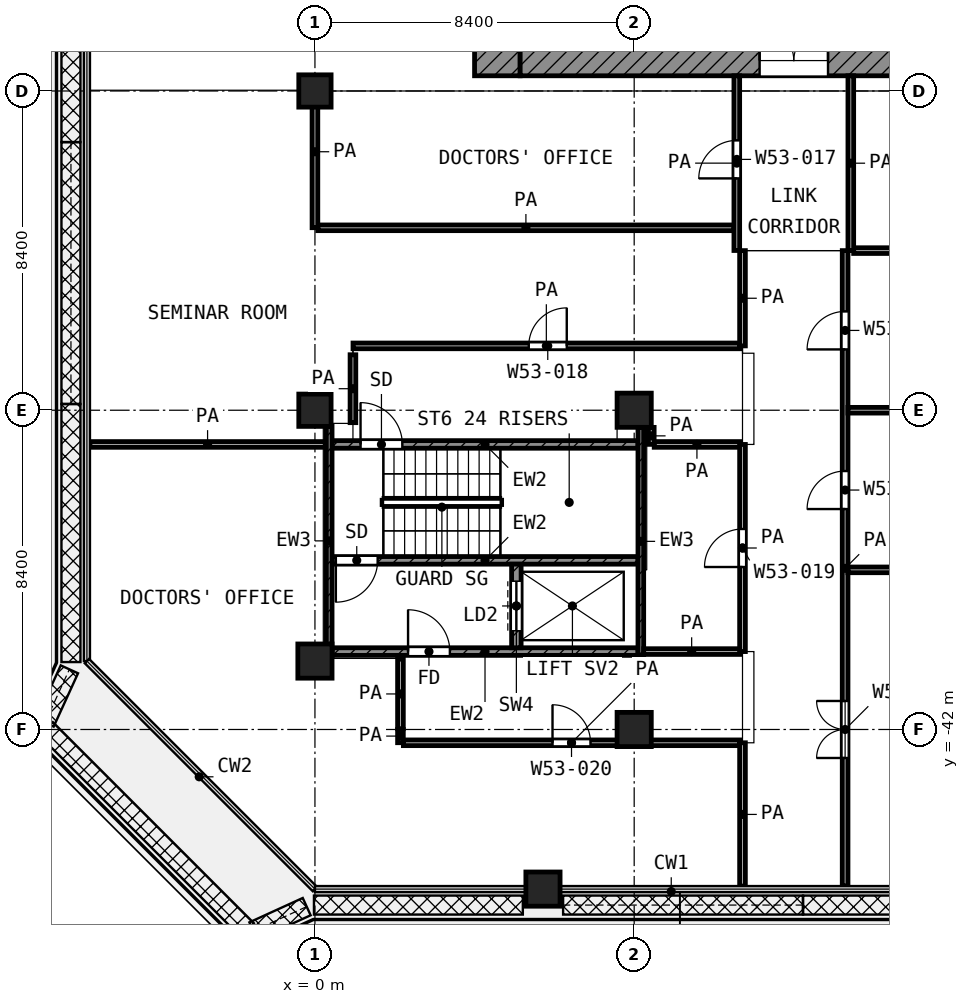
"""IFC4 building model, lengths in metres.
Left out: names, types, materials, properties, quantities, classifications, styles, units other than length and angle.
Written with IfcOpenShell. Run it as: python <this file> out.ifc"""

import sys

from ifc_helpers import new_model, si_unit, direction, frame, frame_2d, origin, origin_2d, place, context, subcontext, project, spatial, rectangle, extrude, element, fill, save


model = new_model("IFC4")
c1 = context("Model", 3, precision=1e-05, world=origin(), true_north=direction((0.0, 1.0)))
c2 = subcontext(c1, "Body", "Model", "MODEL_VIEW")
j1 = project(units=[si_unit("LENGTHUNIT", "METRE"), si_unit("PLANEANGLEUNIT", "RADIAN")], contexts=[c1])
p1 = place(None, origin())
s1 = spatial("IfcSite", under=j1, at=p1, CompositionType="ELEMENT")
p2 = place(p1, origin())
s2 = spatial("IfcBuilding", under=s1, at=p2, CompositionType="ELEMENT")
p3 = place(p2, frame((0.0, 0.0, 251.6)))
s3 = spatial("IfcBuildingStorey", under=s2, at=p3, CompositionType="ELEMENT", Elevation=251.6)
for number, where, z_axis, x_axis in (
    (1, (0.0, -25.2, 0.0), (0.0, 0.0, 1.0), (1.0, 0.0, 0.0)),
    (2, (0.0, -33.6, 0.0), (0.0, 0.0, 1.0), (1.0, 0.0, 0.0)),
):
    element("IfcColumn", number, at=place(p3, frame(where, z_axis=z_axis, x_axis=x_axis)), inside=s3, PredefinedType="COLUMN", context=c2, shape_type="SweptSolid", body=[
        extrude(rectangle(XDim=0.85, YDim=0.85, at=origin_2d()), origin(), (0.0, 0.0, 1.0), 4.2),
    ])
for number, where, z_axis, x_axis in (
    (3, (8.4, -33.6, 0.0), (0.0, 0.0, 1.0), (1.0, 0.0, 0.0)),
    (4, (0.0, -40.2, 0.0), (0.0, 0.0, 1.0), (1.0, 0.0, 0.0)),
    (5, (8.4, -42.0, 0.0), (0.0, 0.0, 1.0), (1.0, 0.0, 0.0)),
    (6, (6.0, -46.2, 0.0), (0.0, 0.0, 1.0), (1.0, 0.0, 0.0)),
):
    element("IfcColumn", number, at=place(p3, frame(where, z_axis=z_axis, x_axis=x_axis)), inside=s3, PredefinedType="COLUMN", context=c2, shape_type="SweptSolid", body=[
        extrude(rectangle(XDim=0.9, YDim=0.9, at=origin_2d()), origin(), (0.0, 0.0, 1.0), 4.2),
    ])
p4 = place(p3, frame((4.8, -24.8, 0.0), z_axis=(0.0, 0.0, 1.0), x_axis=(0.0, 1.0, 0.0)))
e7 = element("IfcWall", 7, at=p4, inside=s3, PredefinedType="SHEAR", context=c2, shape_type="SweptSolid", body=[
    extrude(rectangle(XDim=19.4, YDim=1.2, at=frame_2d((9.7, 0.0))), origin(), (0.0, 0.0, 1.0), 3.6),
])
p5 = place(p4, frame((11.25, 0.0, 0.0)))
e8 = element("IfcOpeningElement", 8, at=p5, cuts=e7, PredefinedType="OPENING", context=c2, shape_type="SweptSolid", body=[
    extrude(rectangle(XDim=1.1, YDim=2.1, at=frame_2d((0.55, 1.05))), frame((0.0, 0.61, 0.0), z_axis=(0.0, -1.0, 0.0), x_axis=(1.0, 0.0, 0.0)), (0.0, 0.0, 1.0), 1.22),
])
p6 = place(p4, frame((1.95, 0.0, 0.0)))
e9 = element("IfcOpeningElement", 9, at=p6, cuts=e7, PredefinedType="OPENING", context=c2, shape_type="SweptSolid", body=[
    extrude(rectangle(XDim=1.1, YDim=2.1, at=frame_2d((0.55, 1.05))), frame((0.0, 0.61, 0.0), z_axis=(0.0, -1.0, 0.0), x_axis=(1.0, 0.0, 0.0)), (0.0, 0.0, 1.0), 1.22),
])
p7 = place(p3, frame((5.4, -24.4, 0.0), z_axis=(0.0, 0.0, 1.0), x_axis=(1.0, 0.0, 0.0)))
e10 = element("IfcWall", 10, at=p7, inside=s3, PredefinedType="SHEAR", context=c2, shape_type="SweptSolid", body=[
    extrude(rectangle(XDim=18.6, YDim=0.8, at=frame_2d((9.3, 0.0))), origin(), (0.0, 0.0, 1.0), 3.6),
])
p8 = place(p7, frame((6.3, 0.0, 0.0)))
e11 = element("IfcOpeningElement", 11, at=p8, cuts=e10, PredefinedType="OPENING", context=c2, shape_type="SweptSolid", body=[
    extrude(rectangle(XDim=1.8, YDim=2.1, at=frame_2d((0.9, 1.05))), frame((0.0, 0.41, 0.0), z_axis=(0.0, -1.0, 0.0), x_axis=(1.0, 0.0, 0.0)), (0.0, 0.0, 1.0), 0.82),
])
p9 = place(p3, frame((0.375, -40.05, 0.0), z_axis=(0.0, 0.0, 1.0), x_axis=(0.0, 1.0, 0.0)))
e12 = element("IfcWall", 12, at=p9, inside=s3, PredefinedType="SHEAR", context=c2, shape_type="SweptSolid", body=[
    extrude(rectangle(XDim=6.025, YDim=0.15, at=frame_2d((3.013, 0.0))), origin(), (0.0, 0.0, 1.0), 3.6),
])
p10 = place(p3, frame((8.575, -40.05, 0.0), z_axis=(0.0, 0.0, 1.0), x_axis=(0.0, 1.0, 0.0)))
e13 = element("IfcWall", 13, at=p10, inside=s3, PredefinedType="SHEAR", context=c2, shape_type="SweptSolid", body=[
    extrude(rectangle(XDim=6.0, YDim=0.15, at=frame_2d((3.0, 0.0))), origin(), (0.0, 0.0, 1.0), 3.6),
])
p11 = place(p3, frame((0.45, -34.5, 0.0), z_axis=(0.0, 0.0, 1.0), x_axis=(1.0, 0.0, 0.0)))
e14 = element("IfcWall", 14, at=p11, inside=s3, PredefinedType="SHEAR", context=c2, shape_type="SweptSolid", body=[
    extrude(rectangle(XDim=8.05, YDim=0.2, at=frame_2d((4.025, 0.0))), origin(), (0.0, 0.0, 1.0), 3.6),
])
p12 = place(p11, frame((0.75, 0.0, 0.0)))
e15 = element("IfcOpeningElement", 15, at=p12, cuts=e14, PredefinedType="OPENING", context=c2, shape_type="SweptSolid", body=[
    extrude(rectangle(XDim=1.1, YDim=2.1, at=frame_2d((0.55, 1.05))), frame((0.0, 0.11, 0.0), z_axis=(0.0, -1.0, 0.0), x_axis=(1.0, 0.0, 0.0)), (0.0, 0.0, 1.0), 0.22),
])
p13 = place(p3, frame((0.45, -37.55, 0.0), z_axis=(0.0, 0.0, 1.0), x_axis=(1.0, 0.0, 0.0)))
e16 = element("IfcWall", 16, at=p13, inside=s3, PredefinedType="SHEAR", context=c2, shape_type="SweptSolid", body=[
    extrude(rectangle(XDim=8.05, YDim=0.2, at=frame_2d((4.025, 0.0))), origin(), (0.0, 0.0, 1.0), 3.6),
])
p14 = place(p13, frame((0.1, 0.0, 0.0)))
e17 = element("IfcOpeningElement", 17, at=p14, cuts=e16, PredefinedType="OPENING", context=c2, shape_type="SweptSolid", body=[
    extrude(rectangle(XDim=1.1, YDim=2.1, at=frame_2d((0.55, 1.05))), frame((0.0, 0.11, 0.0), z_axis=(0.0, -1.0, 0.0), x_axis=(1.0, 0.0, 0.0)), (0.0, 0.0, 1.0), 0.22),
])
p15 = place(p3, frame((0.45, -39.95, 0.0), z_axis=(0.0, 0.0, 1.0), x_axis=(1.0, 0.0, 0.0)))
e18 = element("IfcWall", 18, at=p15, inside=s3, PredefinedType="SHEAR", context=c2, shape_type="SweptSolid", body=[
    extrude(rectangle(XDim=8.05, YDim=0.2, at=frame_2d((4.025, 0.0))), origin(), (0.0, 0.0, 1.0), 3.6),
])
p16 = place(p15, frame((2.0, 0.0, 0.0)))
e19 = element("IfcOpeningElement", 19, at=p16, cuts=e18, PredefinedType="OPENING", context=c2, shape_type="SweptSolid", body=[
    extrude(rectangle(XDim=1.1, YDim=2.1, at=frame_2d((0.55, 1.05))), frame((0.0, 0.11, 0.0), z_axis=(0.0, -1.0, 0.0), x_axis=(1.0, 0.0, 0.0)), (0.0, 0.0, 1.0), 0.22),
])
p17 = place(p3, frame((5.3, -39.85, 0.0), z_axis=(0.0, 0.0, 1.0), x_axis=(0.0, 1.0, 0.0)))
e20 = element("IfcWall", 20, at=p17, inside=s3, PredefinedType="SHEAR", context=c2, shape_type="SweptSolid", body=[
    extrude(rectangle(XDim=2.2, YDim=0.25, at=frame_2d((1.1, 0.0))), origin(), (0.0, 0.0, 1.0), 3.6),
])
p18 = place(p17, frame((0.45, 0.0, 0.0)))
e21 = element("IfcOpeningElement", 21, at=p18, cuts=e20, PredefinedType="OPENING", context=c2, shape_type="SweptSolid", body=[
    extrude(rectangle(XDim=1.3, YDim=2.1, at=frame_2d((0.65, 1.05))), frame((0.0, 0.135, 0.0), z_axis=(0.0, -1.0, 0.0), x_axis=(1.0, 0.0, 0.0)), (0.0, 0.0, 1.0), 0.27),
])
p19 = place(p3, frame((2.327, -42.35, 0.0), z_axis=(0.0, 0.0, 1.0), x_axis=(1.0, 0.0, 0.0)))
e22 = element("IfcWall", 22, at=p19, inside=s3, PredefinedType="PARTITIONING", context=c2, shape_type="SweptSolid", body=[
    extrude(rectangle(XDim=8.848, YDim=0.15, at=frame_2d((4.424, 0.0))), origin(), (0.0, 0.0, 1.0), 3.6),
])
p20 = place(p19, frame((3.924, 0.0, 0.0)))
e23 = element("IfcOpeningElement", 23, at=p20, cuts=e22, PredefinedType="OPENING", context=c2, shape_type="SweptSolid", body=[
    extrude(rectangle(XDim=1.0, YDim=2.1, at=frame_2d((0.5, 1.05))), frame((0.0, 0.085, 0.0), z_axis=(0.0, -1.0, 0.0), x_axis=(1.0, 0.0, 0.0)), (0.0, 0.0, 1.0), 0.17),
])
p21 = place(p3, frame((8.65, -39.95, 0.0), z_axis=(0.0, 0.0, 1.0), x_axis=(1.0, 0.0, 0.0)))
e24 = element("IfcWall", 24, at=p21, inside=s3, PredefinedType="PARTITIONING", context=c2, shape_type="SweptSolid", body=[
    extrude(rectangle(XDim=2.525, YDim=0.15, at=frame_2d((1.263, 0.0))), origin(), (0.0, 0.0, 1.0), 3.6),
])
p22 = place(p3, frame((14.025, -37.8, 0.0), z_axis=(0.0, 0.0, 1.0), x_axis=(1.0, 0.0, 0.0)))
e25 = element("IfcWall", 25, at=p22, inside=s3, PredefinedType="PARTITIONING", context=c2, shape_type="SweptSolid", body=[
    extrude(rectangle(XDim=11.095, YDim=0.15, at=frame_2d((5.548, 0.0))), origin(), (0.0, 0.0, 1.0), 2.7),
])
p23 = place(p3, frame((-5.92, -34.5, 0.0), z_axis=(0.0, 0.0, 1.0), x_axis=(1.0, 0.0, 0.0)))
e26 = element("IfcWall", 26, at=p23, inside=s3, PredefinedType="PARTITIONING", context=c2, shape_type="SweptSolid", body=[
    extrude(rectangle(XDim=6.19, YDim=0.15, at=frame_2d((3.095, 0.0))), origin(), (0.0, 0.0, 1.0), 3.6),
])
p24 = place(p3, frame((8.927, -34.5, 0.0), z_axis=(0.0, 0.0, 1.0), x_axis=(1.0, 0.0, 0.0)))
e27 = element("IfcWall", 27, at=p24, inside=s3, PredefinedType="PARTITIONING", context=c2, shape_type="SweptSolid", body=[
    extrude(rectangle(XDim=2.248, YDim=0.15, at=frame_2d((1.124, 0.0))), origin(), (0.0, 0.0, 1.0), 3.6),
])
p25 = place(p3, frame((14.025, -33.6, 0.0), z_axis=(0.0, 0.0, 1.0), x_axis=(1.0, 0.0, 0.0)))
e28 = element("IfcWall", 28, at=p25, inside=s3, PredefinedType="PARTITIONING", context=c2, shape_type="SweptSolid", body=[
    extrude(rectangle(XDim=11.095, YDim=0.15, at=frame_2d((5.548, 0.0))), origin(), (0.0, 0.0, 1.0), 2.7),
])
p26 = place(p3, frame((1.002, -31.907, 0.0), z_axis=(0.0, 0.0, 1.0), x_axis=(1.0, 0.0, 0.0)))
e29 = element("IfcWall", 29, at=p26, inside=s3, PredefinedType="PARTITIONING", context=c2, shape_type="SweptSolid", body=[
    extrude(rectangle(XDim=10.173, YDim=0.15, at=frame_2d((5.086, 0.0))), origin(), (0.0, 0.0, 1.0), 3.6),
])
p27 = place(p26, frame((4.624, 0.0, 0.0)))
e30 = element("IfcOpeningElement", 30, at=p27, cuts=e29, PredefinedType="OPENING", context=c2, shape_type="SweptSolid", body=[
    extrude(rectangle(XDim=1.0, YDim=2.1, at=frame_2d((0.5, 1.05))), frame((0.0, 0.085, 0.0), z_axis=(0.0, -1.0, 0.0), x_axis=(1.0, 0.0, 0.0)), (0.0, 0.0, 1.0), 0.17),
])
p28 = place(p3, frame((14.175, -29.4, 0.0), z_axis=(0.0, 0.0, 1.0), x_axis=(1.0, 0.0, 0.0)))
e31 = element("IfcWall", 31, at=p28, inside=s3, PredefinedType="PARTITIONING", context=c2, shape_type="SweptSolid", body=[
    extrude(rectangle(XDim=10.95, YDim=0.15, at=frame_2d((5.475, 0.0))), origin(), (0.0, 0.0, 1.0), 3.6),
])
p29 = place(p3, frame((0.077, -28.8, 0.0), z_axis=(0.0, 0.0, 1.0), x_axis=(1.0, 0.0, 0.0)))
e32 = element("IfcWall", 32, at=p29, inside=s3, PredefinedType="PARTITIONING", context=c2, shape_type="SweptSolid", body=[
    extrude(rectangle(XDim=10.948, YDim=0.15, at=frame_2d((5.474, 0.0))), origin(), (0.0, 0.0, 1.0), 3.6),
])
p30 = place(p3, frame((0.0, -28.797, 0.0), z_axis=(0.0, 0.0, 1.0), x_axis=(0.0, 1.0, 0.0)))
e33 = element("IfcWall", 33, at=p30, inside=s3, PredefinedType="PARTITIONING", context=c2, shape_type="SweptSolid", body=[
    extrude(rectangle(XDim=3.997, YDim=0.15, at=frame_2d((1.999, 0.0))), origin(), (0.0, 0.0, 1.0), 3.6),
])
p31 = place(p3, frame((1.0, -33.927, 0.0), z_axis=(0.0, 0.0, 1.0), x_axis=(0.0, 1.0, 0.0)))
e34 = element("IfcWall", 34, at=p31, inside=s3, PredefinedType="PARTITIONING", context=c2, shape_type="SweptSolid", body=[
    extrude(rectangle(XDim=1.787, YDim=0.15, at=frame_2d((0.894, 0.0))), origin(), (0.0, 0.0, 1.0), 3.6),
])
p32 = place(p3, frame((2.25, -42.348, 0.0), z_axis=(0.0, 0.0, 1.0), x_axis=(0.0, 1.0, 0.0)))
e35 = element("IfcWall", 35, at=p32, inside=s3, PredefinedType="PARTITIONING", context=c2, shape_type="SweptSolid", body=[
    extrude(rectangle(XDim=0.348, YDim=0.15, at=frame_2d((0.174, 0.0))), origin(), (0.0, 0.0, 1.0), 3.6),
])
p33 = place(p3, frame((2.25, -41.98, 0.0), z_axis=(0.0, 0.0, 1.0), x_axis=(0.0, 1.0, 0.0)))
e36 = element("IfcWall", 36, at=p33, inside=s3, PredefinedType="PARTITIONING", context=c2, shape_type="SweptSolid", body=[
    extrude(rectangle(XDim=1.83, YDim=0.15, at=frame_2d((0.915, 0.0))), origin(), (0.0, 0.0, 1.0), 3.6),
])
p34 = place(p3, frame((8.85, -34.498, 0.0), z_axis=(0.0, 0.0, 1.0), x_axis=(0.0, 1.0, 0.0)))
e37 = element("IfcWall", 37, at=p34, inside=s3, PredefinedType="PARTITIONING", context=c2, shape_type="SweptSolid", body=[
    extrude(rectangle(XDim=0.447, YDim=0.15, at=frame_2d((0.224, 0.0))), origin(), (0.0, 0.0, 1.0), 3.6),
])
p35 = place(p3, frame((11.1, -29.397, 0.0), z_axis=(0.0, 0.0, 1.0), x_axis=(0.0, 1.0, 0.0)))
e38 = element("IfcWall", 38, at=p35, inside=s3, PredefinedType="PARTITIONING", context=c2, shape_type="SweptSolid", body=[
    extrude(rectangle(XDim=4.597, YDim=0.15, at=frame_2d((2.298, 0.0))), origin(), (0.0, 0.0, 1.0), 3.6),
])
p36 = place(p35, frame((1.897, 0.0, 0.0)))
e39 = element("IfcOpeningElement", 39, at=p36, cuts=e38, PredefinedType="OPENING", context=c2, shape_type="SweptSolid", body=[
    extrude(rectangle(XDim=1.0, YDim=2.1, at=frame_2d((0.5, 1.05))), frame((0.0, 0.085, 0.0), z_axis=(0.0, -1.0, 0.0), x_axis=(1.0, 0.0, 0.0)), (0.0, 0.0, 1.0), 0.17),
])
p37 = place(p3, frame((11.25, -46.12, 0.0), z_axis=(0.0, 0.0, 1.0), x_axis=(0.0, 1.0, 0.0)))
e40 = element("IfcWall", 40, at=p37, inside=s3, PredefinedType="PARTITIONING", context=c2, shape_type="SweptSolid", body=[
    extrude(rectangle(XDim=3.77, YDim=0.15, at=frame_2d((1.885, 0.0))), origin(), (0.0, 0.0, 1.0), 3.6),
])
p38 = place(p3, frame((11.25, -39.95, 0.0), z_axis=(0.0, 0.0, 1.0), x_axis=(0.0, 1.0, 0.0)))
e41 = element("IfcWall", 41, at=p38, inside=s3, PredefinedType="PARTITIONING", context=c2, shape_type="SweptSolid", body=[
    extrude(rectangle(XDim=5.45, YDim=0.15, at=frame_2d((2.725, 0.0))), origin(), (0.0, 0.0, 1.0), 3.6),
])
p39 = place(p38, frame((2.225, 0.0, 0.0)))
e42 = element("IfcOpeningElement", 42, at=p39, cuts=e41, PredefinedType="OPENING", context=c2, shape_type="SweptSolid", body=[
    extrude(rectangle(XDim=1.0, YDim=2.1, at=frame_2d((0.5, 1.05))), frame((0.0, 0.085, 0.0), z_axis=(0.0, -1.0, 0.0), x_axis=(1.0, 0.0, 0.0)), (0.0, 0.0, 1.0), 0.17),
])
p40 = place(p3, frame((11.25, -31.907, 0.0), z_axis=(0.0, 0.0, 1.0), x_axis=(0.0, 1.0, 0.0)))
e43 = element("IfcWall", 43, at=p40, inside=s3, PredefinedType="PARTITIONING", context=c2, shape_type="SweptSolid", body=[
    extrude(rectangle(XDim=2.507, YDim=0.15, at=frame_2d((1.253, 0.0))), origin(), (0.0, 0.0, 1.0), 3.6),
])
p41 = place(p3, frame((13.95, -46.12, 0.0), z_axis=(0.0, 0.0, 1.0), x_axis=(0.0, 1.0, 0.0)))
e44 = element("IfcWall", 44, at=p41, inside=s3, PredefinedType="PARTITIONING", context=c2, shape_type="SweptSolid", body=[
    extrude(rectangle(XDim=16.72, YDim=0.15, at=frame_2d((8.36, 0.0))), origin(), (0.0, 0.0, 1.0), 3.6),
])
p42 = place(p41, frame((14.12, 0.0, 0.0)))
e45 = element("IfcOpeningElement", 45, at=p42, cuts=e44, PredefinedType="OPENING", context=c2, shape_type="SweptSolid", body=[
    extrude(rectangle(XDim=1.0, YDim=2.1, at=frame_2d((0.5, 1.05))), frame((0.0, 0.085, 0.0), z_axis=(0.0, -1.0, 0.0), x_axis=(1.0, 0.0, 0.0)), (0.0, 0.0, 1.0), 0.17),
])
p43 = place(p41, frame((9.92, 0.0, 0.0)))
e46 = element("IfcOpeningElement", 46, at=p43, cuts=e44, PredefinedType="OPENING", context=c2, shape_type="SweptSolid", body=[
    extrude(rectangle(XDim=1.0, YDim=2.1, at=frame_2d((0.5, 1.05))), frame((0.0, 0.085, 0.0), z_axis=(0.0, -1.0, 0.0), x_axis=(1.0, 0.0, 0.0)), (0.0, 0.0, 1.0), 0.17),
])
p44 = place(p41, frame((3.37, 0.0, 0.0)))
e47 = element("IfcOpeningElement", 47, at=p44, cuts=e44, PredefinedType="OPENING", context=c2, shape_type="SweptSolid", body=[
    extrude(rectangle(XDim=1.5, YDim=2.1, at=frame_2d((0.75, 1.05))), frame((0.0, 0.085, 0.0), z_axis=(0.0, -1.0, 0.0), x_axis=(1.0, 0.0, 0.0)), (0.0, 0.0, 1.0), 0.17),
])
p45 = place(p3, frame((14.1, -29.4, 0.0), z_axis=(0.0, 0.0, 1.0), x_axis=(0.0, 1.0, 0.0)))
e48 = element("IfcWall", 48, at=p45, inside=s3, PredefinedType="PARTITIONING", context=c2, shape_type="SweptSolid", body=[
    extrude(rectangle(XDim=4.6, YDim=0.15, at=frame_2d((2.3, 0.0))), origin(), (0.0, 0.0, 1.0), 3.6),
])
p46 = place(p8, origin())
e49 = element("IfcDoor", 49, at=p46, inside=s3, OperationType="DOUBLE_DOOR_SINGLE_SWING", PredefinedType="DOOR", context=c2, shape_type="SweptSolid", body=[
    extrude(rectangle(XDim=1.8, YDim=2.1, at=frame_2d((0.9, 1.05))), frame((0.0, 0.025, 0.0), z_axis=(0.0, -1.0, 0.0), x_axis=(1.0, 0.0, 0.0)), (0.0, 0.0, 1.0), 0.05),
])
fill(e11, e49)
p47 = place(p12, origin())
e50 = element("IfcDoor", 50, at=p47, inside=s3, OperationType="SINGLE_SWING_LEFT", PredefinedType="DOOR", context=c2, shape_type="SweptSolid", body=[
    extrude(rectangle(XDim=1.1, YDim=2.1, at=frame_2d((0.55, 1.05))), frame((0.0, 0.025, 0.0), z_axis=(0.0, -1.0, 0.0), x_axis=(1.0, 0.0, 0.0)), (0.0, 0.0, 1.0), 0.05),
])
fill(e15, e50)
p48 = place(p14, frame((1.1, 0.0, 0.0), z_axis=(0.0, 0.0, 1.0), x_axis=(-1.0, 0.0, 0.0)))
e51 = element("IfcDoor", 51, at=p48, inside=s3, OperationType="SINGLE_SWING_LEFT", PredefinedType="DOOR", context=c2, shape_type="SweptSolid", body=[
    extrude(rectangle(XDim=1.1, YDim=2.1, at=frame_2d((0.55, 1.05))), frame((0.0, 0.025, 0.0), z_axis=(0.0, -1.0, 0.0), x_axis=(1.0, 0.0, 0.0)), (0.0, 0.0, 1.0), 0.05),
])
fill(e17, e51)
p49 = place(p18, origin())
e52 = element("IfcDoor", 52, at=p49, inside=s3, OperationType="DOUBLE_DOOR_SLIDING", PredefinedType="DOOR", context=c2, shape_type="SweptSolid", body=[
    extrude(rectangle(XDim=1.3, YDim=2.1, at=frame_2d((0.65, 1.05))), frame((0.0, 0.025, 0.0), z_axis=(0.0, -1.0, 0.0), x_axis=(1.0, 0.0, 0.0)), (0.0, 0.0, 1.0), 0.05),
])
fill(e21, e52)
p50 = place(p16, origin())
e53 = element("IfcDoor", 53, at=p50, inside=s3, OperationType="SINGLE_SWING_LEFT", PredefinedType="DOOR", context=c2, shape_type="SweptSolid", body=[
    extrude(rectangle(XDim=1.1, YDim=2.1, at=frame_2d((0.55, 1.05))), frame((0.0, 0.025, 0.0), z_axis=(0.0, -1.0, 0.0), x_axis=(1.0, 0.0, 0.0)), (0.0, 0.0, 1.0), 0.05),
])
fill(e19, e53)
p51 = place(p36, origin())
e54 = element("IfcDoor", 54, at=p51, inside=s3, OperationType="SINGLE_SWING_LEFT", PredefinedType="DOOR", context=c2, shape_type="SweptSolid", body=[
    extrude(rectangle(XDim=1.0, YDim=2.1, at=frame_2d((0.5, 1.05))), frame((0.0, 0.025, 0.0), z_axis=(0.0, -1.0, 0.0), x_axis=(1.0, 0.0, 0.0)), (0.0, 0.0, 1.0), 0.05),
])
fill(e39, e54)
p52 = place(p27, origin())
e55 = element("IfcDoor", 55, at=p52, inside=s3, OperationType="SINGLE_SWING_RIGHT", PredefinedType="DOOR", context=c2, shape_type="SweptSolid", body=[
    extrude(rectangle(XDim=1.0, YDim=2.1, at=frame_2d((0.5, 1.05))), frame((0.0, 0.025, 0.0), z_axis=(0.0, -1.0, 0.0), x_axis=(1.0, 0.0, 0.0)), (0.0, 0.0, 1.0), 0.05),
])
fill(e30, e55)
p53 = place(p39, origin())
e56 = element("IfcDoor", 56, at=p53, inside=s3, OperationType="SINGLE_SWING_LEFT", PredefinedType="DOOR", context=c2, shape_type="SweptSolid", body=[
    extrude(rectangle(XDim=1.0, YDim=2.1, at=frame_2d((0.5, 1.05))), frame((0.0, 0.025, 0.0), z_axis=(0.0, -1.0, 0.0), x_axis=(1.0, 0.0, 0.0)), (0.0, 0.0, 1.0), 0.05),
])
fill(e42, e56)
p54 = place(p20, origin())
e57 = element("IfcDoor", 57, at=p54, inside=s3, OperationType="SINGLE_SWING_LEFT", PredefinedType="DOOR", context=c2, shape_type="SweptSolid", body=[
    extrude(rectangle(XDim=1.0, YDim=2.1, at=frame_2d((0.5, 1.05))), frame((0.0, 0.025, 0.0), z_axis=(0.0, -1.0, 0.0), x_axis=(1.0, 0.0, 0.0)), (0.0, 0.0, 1.0), 0.05),
])
fill(e23, e57)
p55 = place(p42, origin())
e58 = element("IfcDoor", 58, at=p55, inside=s3, OperationType="SINGLE_SWING_LEFT", PredefinedType="DOOR", context=c2, shape_type="SweptSolid", body=[
    extrude(rectangle(XDim=1.0, YDim=2.1, at=frame_2d((0.5, 1.05))), frame((0.0, 0.025, 0.0), z_axis=(0.0, -1.0, 0.0), x_axis=(1.0, 0.0, 0.0)), (0.0, 0.0, 1.0), 0.05),
])
fill(e45, e58)
p56 = place(p43, origin())
e59 = element("IfcDoor", 59, at=p56, inside=s3, OperationType="SINGLE_SWING_LEFT", PredefinedType="DOOR", context=c2, shape_type="SweptSolid", body=[
    extrude(rectangle(XDim=1.0, YDim=2.1, at=frame_2d((0.5, 1.05))), frame((0.0, 0.025, 0.0), z_axis=(0.0, -1.0, 0.0), x_axis=(1.0, 0.0, 0.0)), (0.0, 0.0, 1.0), 0.05),
])
fill(e46, e59)
p57 = place(p44, origin())
e60 = element("IfcDoor", 60, at=p57, inside=s3, OperationType="DOUBLE_DOOR_SINGLE_SWING", PredefinedType="DOOR", context=c2, shape_type="SweptSolid", body=[
    extrude(rectangle(XDim=1.5, YDim=2.1, at=frame_2d((0.75, 1.05))), frame((0.0, 0.025, 0.0), z_axis=(0.0, -1.0, 0.0), x_axis=(1.0, 0.0, 0.0)), (0.0, 0.0, 1.0), 0.05),
])
fill(e47, e60)
save(model, sys.argv[1])
